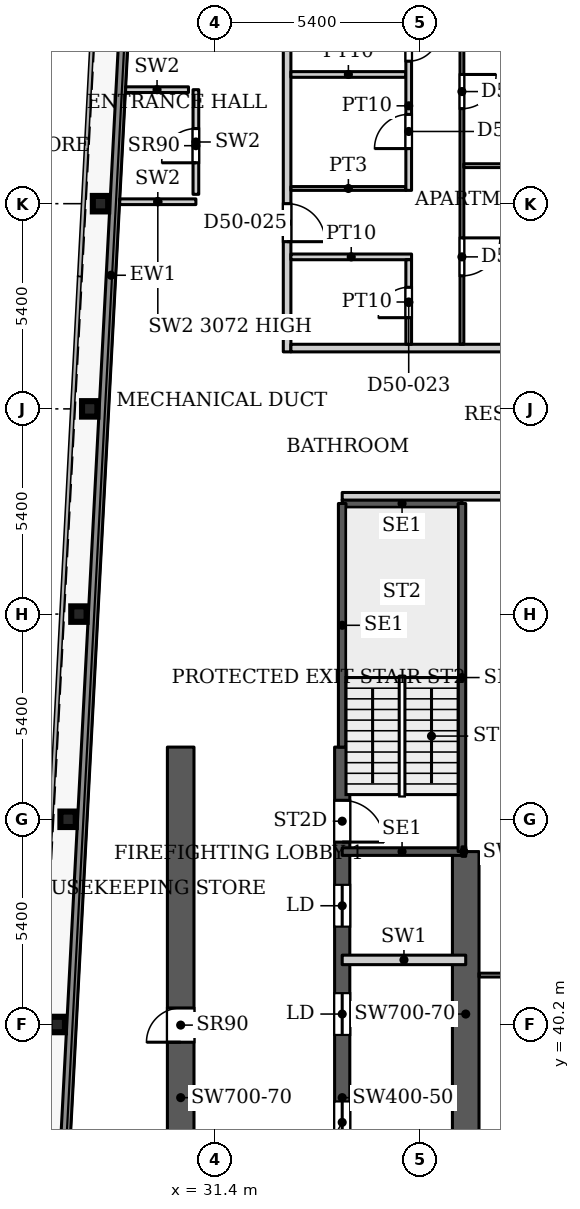
"""IFC4 building model, lengths in metres.
Left out: names, types, materials, properties, quantities, classifications, styles, units other than length and angle.
Written with IfcOpenShell. Run it as: python <this file> out.ifc"""

import sys

from ifc_helpers import new_model, si_unit, direction, frame, frame_2d, origin, origin_2d, place, context, subcontext, project, spatial, rectangle, i_section, extrude, source, transform, mapped, element, fill, save


model = new_model("IFC4")
c1 = context("Model", 3, precision=1e-05, world=origin(), true_north=direction((0.0, 1.0)))
c2 = subcontext(c1, "Body", "Model", "MODEL_VIEW")
j1 = project(units=[si_unit("LENGTHUNIT", "METRE"), si_unit("PLANEANGLEUNIT", "RADIAN")], contexts=[c1])
p1 = place(None, origin())
s1 = spatial("IfcSite", under=j1, at=p1, CompositionType="ELEMENT")
p2 = place(p1, origin())
s2 = spatial("IfcBuilding", under=s1, at=p2, CompositionType="ELEMENT")
p3 = place(p2, frame((0.0, 0.0, 220.1)))
s3 = spatial("IfcBuildingStorey", under=s2, at=p3, CompositionType="ELEMENT", Elevation=220.1)
for number, where, z_axis, x_axis in (
    (1, (27.253, 40.2, 0.0), (0.0, 0.0, 1.0), (1.0, 0.0, 0.0)),
    (2, (27.537, 45.6, 0.0), (0.0, 0.0, 1.0), (1.0, 0.0, 0.0)),
    (3, (27.822, 51.0, 0.0), (0.0, 0.0, 1.0), (1.0, 0.0, 0.0)),
    (4, (28.106, 56.4, 0.0), (0.0, 0.0, 1.0), (1.0, 0.0, 0.0)),
    (5, (28.39, 61.8, 0.0), (0.0, 0.0, 1.0), (1.0, 0.0, 0.0)),
):
    element("IfcColumn", number, at=place(p3, frame(where, z_axis=z_axis, x_axis=x_axis)), inside=s3, PredefinedType="COLUMN", context=c2, shape_type="SweptSolid", body=[
        extrude(i_section(OverallWidth=0.404, OverallDepth=0.407, WebThickness=0.027, FlangeThickness=0.044, FilletRadius=0.012, at=origin_2d()), origin(), (0.0, 0.0, 1.0), 3.9),
    ])
p4 = place(p3, frame((34.75, 29.05, 0.0), z_axis=(0.0, 0.0, 1.0), x_axis=(0.0, 1.0, 0.0)))
e6 = element("IfcWall", 6, at=p4, inside=s3, PredefinedType="SHEAR", context=c2, shape_type="SweptSolid", body=[
    extrude(rectangle(XDim=18.45, YDim=0.4, at=frame_2d((9.225, 0.0))), origin(), (0.0, 0.0, 1.0), 3.9),
])
p5 = place(p4, frame((8.025, 0.0, 0.0)))
e7 = element("IfcOpeningElement", 7, at=p5, cuts=e6, PredefinedType="OPENING", context=c2, shape_type="SweptSolid", body=[
    extrude(rectangle(XDim=1.1, YDim=2.2, at=frame_2d((0.55, 1.1))), frame((0.0, 0.21, 0.0), z_axis=(0.0, -1.0, 0.0), x_axis=(1.0, 0.0, 0.0)), (0.0, 0.0, 1.0), 0.42),
])
p6 = place(p4, frame((10.875, 0.0, 0.0)))
e8 = element("IfcOpeningElement", 8, at=p6, cuts=e6, PredefinedType="OPENING", context=c2, shape_type="SweptSolid", body=[
    extrude(rectangle(XDim=1.1, YDim=2.2, at=frame_2d((0.55, 1.1))), frame((0.0, 0.21, 0.0), z_axis=(0.0, -1.0, 0.0), x_axis=(1.0, 0.0, 0.0)), (0.0, 0.0, 1.0), 0.42),
])
p7 = place(p4, frame((13.725, 0.0, 0.0)))
e9 = element("IfcOpeningElement", 9, at=p7, cuts=e6, PredefinedType="OPENING", context=c2, shape_type="SweptSolid", body=[
    extrude(rectangle(XDim=1.1, YDim=2.2, at=frame_2d((0.55, 1.1))), frame((0.0, 0.21, 0.0), z_axis=(0.0, -1.0, 0.0), x_axis=(1.0, 0.0, 0.0)), (0.0, 0.0, 1.0), 0.42),
])
p8 = place(p4, frame((15.95, 0.0, 0.0)))
e10 = element("IfcOpeningElement", 10, at=p8, cuts=e6, PredefinedType="OPENING", context=c2, shape_type="SweptSolid", body=[
    extrude(rectangle(XDim=1.1, YDim=2.2, at=frame_2d((0.55, 1.1))), frame((0.0, 0.21, 0.0), z_axis=(0.0, -1.0, 0.0), x_axis=(1.0, 0.0, 0.0)), (0.0, 0.0, 1.0), 0.42),
])
p9 = place(p3, frame((38.0, 36.2, 0.0), z_axis=(0.0, 0.0, 1.0), x_axis=(0.0, 1.0, 0.0)))
e11 = element("IfcWall", 11, at=p9, inside=s3, PredefinedType="SHEAR", context=c2, shape_type="SweptSolid", body=[
    extrude(rectangle(XDim=8.55, YDim=0.7, at=frame_2d((4.275, 0.0))), origin(), (0.0, 0.0, 1.0), 3.9),
])
p10 = place(p3, frame((30.5, 29.05, 0.0), z_axis=(0.0, 0.0, 1.0), x_axis=(0.0, 1.0, 0.0)))
e12 = element("IfcWall", 12, at=p10, inside=s3, PredefinedType="SHEAR", context=c2, shape_type="SweptSolid", body=[
    extrude(rectangle(XDim=18.45, YDim=0.7, at=frame_2d((9.225, 0.0))), origin(), (0.0, 0.0, 1.0), 3.9),
])
p11 = place(p10, frame((6.21, 0.0, 0.0)))
e13 = element("IfcOpeningElement", 13, at=p11, cuts=e12, PredefinedType="OPENING", context=c2, shape_type="SweptSolid", body=[
    extrude(rectangle(XDim=0.9, YDim=2.2, at=frame_2d((0.45, 1.1))), frame((0.0, 0.36, 0.0), z_axis=(0.0, -1.0, 0.0), x_axis=(1.0, 0.0, 0.0)), (0.0, 0.0, 1.0), 0.72),
])
p12 = place(p10, frame((10.684, 0.0, 0.0)))
e14 = element("IfcOpeningElement", 14, at=p12, cuts=e12, PredefinedType="OPENING", context=c2, shape_type="SweptSolid", body=[
    extrude(rectangle(XDim=0.9, YDim=2.2, at=frame_2d((0.45, 1.1))), frame((0.0, 0.36, 0.0), z_axis=(0.0, -1.0, 0.0), x_axis=(1.0, 0.0, 0.0)), (0.0, 0.0, 1.0), 0.72),
])
p13 = place(p3, frame((27.195, 31.969, 0.0), z_axis=(0.0, 0.0, 1.0), x_axis=(0.052559748861, 0.998617781135, 0.0)))
e15 = element("IfcWall", 15, at=p13, inside=s3, PredefinedType="SOLIDWALL", context=c2, shape_type="SweptSolid", body=[
    extrude(rectangle(XDim=55.972, YDim=0.25, at=frame_2d((27.986, 0.0))), origin(), (0.0, 0.0, 1.0), 3.75),
])
for number, where, z_axis, x_axis in (
    (16, (34.75, 44.75, 0.0), (0.0, 0.0, 1.0), (1.0, 0.0, 0.0)),
    (17, (34.75, 53.91, 0.0), (0.0, 0.0, 1.0), (1.0, 0.0, 0.0)),
):
    element("IfcWall", number, at=place(p3, frame(where, z_axis=z_axis, x_axis=x_axis)), inside=s3, PredefinedType="SHEAR", context=c2, shape_type="SweptSolid", body=[
        extrude(rectangle(XDim=3.15, YDim=0.2, at=frame_2d((1.575, 0.0))), origin(), (0.0, 0.0, 1.0), 3.9),
    ])
p14 = place(p3, frame((34.75, 47.5, 0.0), z_axis=(0.0, 0.0, 1.0), x_axis=(0.0, 1.0, 0.0)))
e18 = element("IfcWall", 18, at=p14, inside=s3, PredefinedType="SHEAR", context=c2, shape_type="SweptSolid", body=[
    extrude(rectangle(XDim=6.41, YDim=0.2, at=frame_2d((3.205, 0.0))), origin(), (0.0, 0.0, 1.0), 3.9),
])
p15 = place(p3, frame((37.9, 44.75, 0.0), z_axis=(0.0, 0.0, 1.0), x_axis=(0.0, 1.0, 0.0)))
e19 = element("IfcWall", 19, at=p15, inside=s3, PredefinedType="SHEAR", context=c2, shape_type="SweptSolid", body=[
    extrude(rectangle(XDim=9.16, YDim=0.2, at=frame_2d((4.58, 0.0))), origin(), (0.0, 0.0, 1.0), 3.9),
])
p16 = place(p3, frame((34.75, 41.9, 0.0), z_axis=(0.0, 0.0, 1.0), x_axis=(1.0, 0.0, 0.0)))
e20 = element("IfcWall", 20, at=p16, inside=s3, PredefinedType="PARTITIONING", context=c2, shape_type="SweptSolid", body=[
    extrude(rectangle(XDim=3.25, YDim=0.25, at=frame_2d((1.625, 0.0))), origin(), (0.0, 0.0, 1.0), 3.9),
])
p17 = place(p3, frame((37.9, 44.75, 0.0), z_axis=(0.0, 0.0, 1.0), x_axis=(1.0, 0.0, 0.0)))
e21 = element("IfcWall", 21, at=p17, inside=s3, PredefinedType="PARTITIONING", context=c2, shape_type="SweptSolid", body=[
    extrude(rectangle(XDim=0.1, YDim=0.25, at=frame_2d((0.05, 0.0))), origin(), (0.0, 0.0, 1.0), 3.9),
])
p18 = place(p3, frame((28.896, 61.851, 0.0), z_axis=(0.0, 0.0, 1.0), x_axis=(1.0, 0.0, 0.0)))
e22 = element("IfcWall", 22, at=p18, inside=s3, PredefinedType="PARTITIONING", context=c2, shape_type="SweptSolid", body=[
    extrude(rectangle(XDim=2.004, YDim=0.15, at=frame_2d((1.002, 0.0))), origin(), (0.0, 0.0, 1.0), 3.072),
])
p19 = place(p3, frame((30.9, 62.046, 0.0), z_axis=(0.0, 0.0, 1.0), x_axis=(0.0, 1.0, 0.0)))
e23 = element("IfcWall", 23, at=p19, inside=s3, PredefinedType="PARTITIONING", context=c2, shape_type="SweptSolid", body=[
    extrude(rectangle(XDim=2.754, YDim=0.15, at=frame_2d((1.377, 0.0))), origin(), (0.0, 0.0, 1.0), 3.9),
])
p20 = place(p19, frame((0.83, 0.0, 0.0)))
e24 = element("IfcOpeningElement", 24, at=p20, cuts=e23, PredefinedType="OPENING", context=c2, shape_type="SweptSolid", body=[
    extrude(rectangle(XDim=0.9, YDim=2.2, at=frame_2d((0.45, 1.1))), frame((0.0, 0.085, 0.0), z_axis=(0.0, -1.0, 0.0), x_axis=(1.0, 0.0, 0.0)), (0.0, 0.0, 1.0), 0.17),
])
p21 = place(p3, frame((29.051, 64.8, 0.0), z_axis=(0.0, 0.0, 1.0), x_axis=(1.0, 0.0, 0.0)))
e25 = element("IfcWall", 25, at=p21, inside=s3, PredefinedType="PARTITIONING", context=c2, shape_type="SweptSolid", body=[
    extrude(rectangle(XDim=1.654, YDim=0.15, at=frame_2d((0.827, 0.0))), origin(), (0.0, 0.0, 1.0), 3.9),
])
p22 = place(p3, frame((33.3, 57.9, 0.0), z_axis=(0.0, 0.0, 1.0), x_axis=(0.0, 1.0, 0.0)))
e26 = element("IfcWall", 26, at=p22, inside=s3, PredefinedType="PARTITIONING", context=c2, shape_type="SweptSolid", body=[
    extrude(rectangle(XDim=17.6, YDim=0.2, at=frame_2d((8.8, 0.0))), origin(), (0.0, 0.0, 1.0), 3.6),
])
p23 = place(p22, frame((2.9, 0.0, 0.0)))
e27 = element("IfcOpeningElement", 27, at=p23, cuts=e26, PredefinedType="OPENING", context=c2, shape_type="SweptSolid", body=[
    extrude(rectangle(XDim=1.0, YDim=2.1, at=frame_2d((0.5, 1.05))), frame((0.0, 0.11, 0.0), z_axis=(0.0, -1.0, 0.0), x_axis=(1.0, 0.0, 0.0)), (0.0, 0.0, 1.0), 0.22),
])
p24 = place(p22, frame((10.7, 0.0, 0.0)))
e28 = element("IfcOpeningElement", 28, at=p24, cuts=e26, PredefinedType="OPENING", context=c2, shape_type="SweptSolid", body=[
    extrude(rectangle(XDim=1.0, YDim=2.1, at=frame_2d((0.5, 1.05))), frame((0.0, 0.11, 0.0), z_axis=(0.0, -1.0, 0.0), x_axis=(1.0, 0.0, 0.0)), (0.0, 0.0, 1.0), 0.22),
])
p25 = place(p3, frame((33.4, 58.0, 0.0), z_axis=(0.0, 0.0, 1.0), x_axis=(1.0, 0.0, 0.0)))
e29 = element("IfcWall", 29, at=p25, inside=s3, PredefinedType="PARTITIONING", context=c2, shape_type="SweptSolid", body=[
    extrude(rectangle(XDim=12.5, YDim=0.2, at=frame_2d((6.25, 0.0))), origin(), (0.0, 0.0, 1.0), 3.6),
])
p26 = place(p3, frame((33.4, 60.4, 0.0), z_axis=(0.0, 0.0, 1.0), x_axis=(1.0, 0.0, 0.0)))
e30 = element("IfcWall", 30, at=p26, inside=s3, PredefinedType="PARTITIONING", context=c2, shape_type="SweptSolid", body=[
    extrude(rectangle(XDim=3.175, YDim=0.15, at=frame_2d((1.587, 0.0))), origin(), (0.0, 0.0, 1.0), 3.6),
])
p27 = place(p3, frame((33.4, 62.2, 0.0), z_axis=(0.0, 0.0, 1.0), x_axis=(1.0, 0.0, 0.0)))
e31 = element("IfcWall", 31, at=p27, inside=s3, PredefinedType="PARTITIONING", context=c2, shape_type="SweptSolid", body=[
    extrude(rectangle(XDim=3.025, YDim=0.1, at=frame_2d((1.513, 0.0))), origin(), (0.0, 0.0, 1.0), 3.6),
])
p28 = place(p3, frame((33.4, 65.2, 0.0), z_axis=(0.0, 0.0, 1.0), x_axis=(1.0, 0.0, 0.0)))
e32 = element("IfcWall", 32, at=p28, inside=s3, PredefinedType="PARTITIONING", context=c2, shape_type="SweptSolid", body=[
    extrude(rectangle(XDim=3.025, YDim=0.15, at=frame_2d((1.513, 0.0))), origin(), (0.0, 0.0, 1.0), 3.6),
])
p29 = place(p3, frame((34.75, 54.1, 0.0), z_axis=(0.0, 0.0, 1.0), x_axis=(1.0, 0.0, 0.0)))
e33 = element("IfcWall", 33, at=p29, inside=s3, PredefinedType="PARTITIONING", context=c2, shape_type="SweptSolid", body=[
    extrude(rectangle(XDim=11.15, YDim=0.2, at=frame_2d((5.575, 0.0))), origin(), (0.0, 0.0, 1.0), 3.6),
])
p30 = place(p29, frame((5.075, 0.0, 0.0)))
e34 = element("IfcOpeningElement", 34, at=p30, cuts=e33, PredefinedType="OPENING", context=c2, shape_type="SweptSolid", body=[
    extrude(rectangle(XDim=1.0, YDim=2.1, at=frame_2d((0.5, 1.05))), frame((0.0, 0.11, 0.0), z_axis=(0.0, -1.0, 0.0), x_axis=(1.0, 0.0, 0.0)), (0.0, 0.0, 1.0), 0.22),
])
p31 = place(p3, frame((36.5, 58.1, 0.0), z_axis=(0.0, 0.0, 1.0), x_axis=(0.0, 1.0, 0.0)))
e35 = element("IfcWall", 35, at=p31, inside=s3, PredefinedType="PARTITIONING", context=c2, shape_type="SweptSolid", body=[
    extrude(rectangle(XDim=2.225, YDim=0.15, at=frame_2d((1.112, 0.0))), origin(), (0.0, 0.0, 1.0), 3.6),
])
p32 = place(p31, frame((0.7, 0.0, 0.0)))
e36 = element("IfcOpeningElement", 36, at=p32, cuts=e35, PredefinedType="OPENING", context=c2, shape_type="SweptSolid", body=[
    extrude(rectangle(XDim=0.8, YDim=2.1, at=frame_2d((0.4, 1.05))), frame((0.0, 0.085, 0.0), z_axis=(0.0, -1.0, 0.0), x_axis=(1.0, 0.0, 0.0)), (0.0, 0.0, 1.0), 0.17),
])
p33 = place(p3, frame((36.5, 62.15, 0.0), z_axis=(0.0, 0.0, 1.0), x_axis=(0.0, 1.0, 0.0)))
e37 = element("IfcWall", 37, at=p33, inside=s3, PredefinedType="PARTITIONING", context=c2, shape_type="SweptSolid", body=[
    extrude(rectangle(XDim=4.45, YDim=0.15, at=frame_2d((2.225, 0.0))), origin(), (0.0, 0.0, 1.0), 3.6),
])
p34 = place(p33, frame((1.1, 0.0, 0.0)))
e38 = element("IfcOpeningElement", 38, at=p34, cuts=e37, PredefinedType="OPENING", context=c2, shape_type="SweptSolid", body=[
    extrude(rectangle(XDim=0.9, YDim=2.1, at=frame_2d((0.45, 1.05))), frame((0.0, 0.085, 0.0), z_axis=(0.0, -1.0, 0.0), x_axis=(1.0, 0.0, 0.0)), (0.0, 0.0, 1.0), 0.17),
])
p35 = place(p33, frame((3.4, 0.0, 0.0)))
e39 = element("IfcOpeningElement", 39, at=p35, cuts=e37, PredefinedType="OPENING", context=c2, shape_type="SweptSolid", body=[
    extrude(rectangle(XDim=0.8, YDim=2.1, at=frame_2d((0.4, 1.05))), frame((0.0, 0.085, 0.0), z_axis=(0.0, -1.0, 0.0), x_axis=(1.0, 0.0, 0.0)), (0.0, 0.0, 1.0), 0.17),
])
p36 = place(p3, frame((37.9, 58.1, 0.0), z_axis=(0.0, 0.0, 1.0), x_axis=(0.0, 1.0, 0.0)))
e40 = element("IfcWall", 40, at=p36, inside=s3, PredefinedType="PARTITIONING", context=c2, shape_type="SweptSolid", body=[
    extrude(rectangle(XDim=8.5, YDim=0.1, at=frame_2d((4.25, 0.0))), origin(), (0.0, 0.0, 1.0), 3.6),
])
p37 = place(p36, frame((6.2, 0.0, 0.0)))
e41 = element("IfcOpeningElement", 41, at=p37, cuts=e40, PredefinedType="OPENING", context=c2, shape_type="SweptSolid", body=[
    extrude(rectangle(XDim=0.9, YDim=2.1, at=frame_2d((0.45, 1.05))), frame((0.0, 0.06, 0.0), z_axis=(0.0, -1.0, 0.0), x_axis=(1.0, 0.0, 0.0)), (0.0, 0.0, 1.0), 0.12),
])
p38 = place(p36, frame((1.8, 0.0, 0.0)))
e42 = element("IfcOpeningElement", 42, at=p38, cuts=e40, PredefinedType="OPENING", context=c2, shape_type="SweptSolid", body=[
    extrude(rectangle(XDim=1.0, YDim=2.1, at=frame_2d((0.5, 1.05))), frame((0.0, 0.06, 0.0), z_axis=(0.0, -1.0, 0.0), x_axis=(1.0, 0.0, 0.0)), (0.0, 0.0, 1.0), 0.12),
])
p39 = place(p3, frame((37.95, 62.8, 0.0), z_axis=(0.0, 0.0, 1.0), x_axis=(1.0, 0.0, 0.0)))
e43 = element("IfcWall", 43, at=p39, inside=s3, PredefinedType="PARTITIONING", context=c2, shape_type="SweptSolid", body=[
    extrude(rectangle(XDim=7.95, YDim=0.1, at=frame_2d((3.975, 0.0))), origin(), (0.0, 0.0, 1.0), 3.6),
])
p40 = place(p3, frame((38.349, 41.5, 0.0), z_axis=(0.0, 0.0, 1.0), x_axis=(1.0, 0.0, 0.0)))
e44 = element("IfcWall", 44, at=p40, inside=s3, PredefinedType="PARTITIONING", context=c2, shape_type="SweptSolid", body=[
    extrude(rectangle(XDim=14.951, YDim=0.1, at=frame_2d((7.476, 0.0))), origin(), (0.0, 0.0, 1.0), 3.6),
])
p41 = place(p40, frame((6.851, 0.0, 0.0)))
e45 = element("IfcOpeningElement", 45, at=p41, cuts=e44, PredefinedType="OPENING", context=c2, shape_type="SweptSolid", body=[
    extrude(rectangle(XDim=1.0, YDim=2.1, at=frame_2d((0.5, 1.05))), frame((0.0, 0.06, 0.0), z_axis=(0.0, -1.0, 0.0), x_axis=(1.0, 0.0, 0.0)), (0.0, 0.0, 1.0), 0.12),
])
m1 = source(origin(), c2, "Body", "SweptSolid", [
    extrude(rectangle(XDim=1.1, YDim=2.2, at=frame_2d((0.55, 1.1))), frame((0.0, 0.025, 0.0), z_axis=(0.0, -1.0, 0.0), x_axis=(1.0, 0.0, 0.0)), (0.0, 0.0, 1.0), 0.05),
])
p42 = place(p5, origin())
e46 = element("IfcDoor", 46, at=p42, inside=s3, OperationType="SLIDING_TO_LEFT", PredefinedType="DOOR", context=c2, shape_type="MappedRepresentation", body=[
    mapped(m1, transform((0.0, 0.0, 0.0), x_axis=(1.0, 0.0, 0.0), y_axis=(0.0, 1.0, 0.0), z_axis=(0.0, 0.0, 1.0), scale=1.0)),
])
fill(e7, e46)
p43 = place(p6, origin())
e47 = element("IfcDoor", 47, at=p43, inside=s3, OperationType="SLIDING_TO_LEFT", PredefinedType="DOOR", context=c2, shape_type="MappedRepresentation", body=[
    mapped(m1, transform((0.0, 0.0, 0.0), x_axis=(1.0, 0.0, 0.0), y_axis=(0.0, 1.0, 0.0), z_axis=(0.0, 0.0, 1.0), scale=1.0)),
])
fill(e8, e47)
p44 = place(p7, origin())
e48 = element("IfcDoor", 48, at=p44, inside=s3, OperationType="SLIDING_TO_LEFT", PredefinedType="DOOR", context=c2, shape_type="MappedRepresentation", body=[
    mapped(m1, transform((0.0, 0.0, 0.0), x_axis=(1.0, 0.0, 0.0), y_axis=(0.0, 1.0, 0.0), z_axis=(0.0, 0.0, 1.0), scale=1.0)),
])
fill(e9, e48)
m2 = source(origin(), c2, "Body", "SweptSolid", [
    extrude(rectangle(XDim=0.9, YDim=2.2, at=frame_2d((0.45, 1.1))), frame((0.0, 0.025, 0.0), z_axis=(0.0, -1.0, 0.0), x_axis=(1.0, 0.0, 0.0)), (0.0, 0.0, 1.0), 0.05),
])
p45 = place(p12, origin())
e49 = element("IfcDoor", 49, at=p45, inside=s3, OperationType="SINGLE_SWING_LEFT", PredefinedType="DOOR", context=c2, shape_type="MappedRepresentation", body=[
    mapped(m2, transform((0.0, 0.0, 0.0), x_axis=(1.0, 0.0, 0.0), y_axis=(0.0, 1.0, 0.0), z_axis=(0.0, 0.0, 1.0), scale=1.0)),
])
fill(e14, e49)
p46 = place(p20, origin())
e50 = element("IfcDoor", 50, at=p46, inside=s3, OperationType="SINGLE_SWING_LEFT", PredefinedType="DOOR", context=c2, shape_type="MappedRepresentation", body=[
    mapped(m2, transform((0.0, 0.0, 0.0), x_axis=(1.0, 0.0, 0.0), y_axis=(0.0, 1.0, 0.0), z_axis=(0.0, 0.0, 1.0), scale=1.0)),
])
fill(e24, e50)
m3 = source(origin(), c2, "Body", "SweptSolid", [
    extrude(rectangle(XDim=1.1, YDim=2.2, at=frame_2d((0.55, 1.1))), frame((0.0, 0.025, 0.0), z_axis=(0.0, -1.0, 0.0), x_axis=(1.0, 0.0, 0.0)), (0.0, 0.0, 1.0), 0.05),
])
p47 = place(p8, origin())
e51 = element("IfcDoor", 51, at=p47, inside=s3, OperationType="SINGLE_SWING_RIGHT", PredefinedType="DOOR", context=c2, shape_type="MappedRepresentation", body=[
    mapped(m3, transform((0.0, 0.0, 0.0), x_axis=(1.0, 0.0, 0.0), y_axis=(0.0, 1.0, 0.0), z_axis=(0.0, 0.0, 1.0), scale=1.0)),
])
fill(e10, e51)
m4 = source(origin(), c2, "Body", "SweptSolid", [
    extrude(rectangle(XDim=0.8, YDim=2.1, at=frame_2d((0.4, 1.05))), frame((0.0, 0.025, 0.0), z_axis=(0.0, -1.0, 0.0), x_axis=(1.0, 0.0, 0.0)), (0.0, 0.0, 1.0), 0.05),
])
p48 = place(p32, origin())
e52 = element("IfcDoor", 52, at=p48, inside=s3, OperationType="SINGLE_SWING_LEFT", PredefinedType="DOOR", context=c2, shape_type="MappedRepresentation", body=[
    mapped(m4, transform((0.0, 0.0, 0.0), x_axis=(1.0, 0.0, 0.0), y_axis=(0.0, 1.0, 0.0), z_axis=(0.0, 0.0, 1.0), scale=1.0)),
])
fill(e36, e52)
m5 = source(origin(), c2, "Body", "SweptSolid", [
    extrude(rectangle(XDim=0.9, YDim=2.1, at=frame_2d((0.45, 1.05))), frame((0.0, 0.025, 0.0), z_axis=(0.0, -1.0, 0.0), x_axis=(1.0, 0.0, 0.0)), (0.0, 0.0, 1.0), 0.05),
])
p49 = place(p37, origin())
e53 = element("IfcDoor", 53, at=p49, inside=s3, OperationType="SINGLE_SWING_RIGHT", PredefinedType="DOOR", context=c2, shape_type="MappedRepresentation", body=[
    mapped(m5, transform((0.0, 0.0, 0.0), x_axis=(1.0, 0.0, 0.0), y_axis=(0.0, 1.0, 0.0), z_axis=(0.0, 0.0, 1.0), scale=1.0)),
])
fill(e41, e53)
m6 = source(origin(), c2, "Body", "SweptSolid", [
    extrude(rectangle(XDim=1.0, YDim=2.1, at=frame_2d((0.5, 1.05))), frame((0.0, 0.025, 0.0), z_axis=(0.0, -1.0, 0.0), x_axis=(1.0, 0.0, 0.0)), (0.0, 0.0, 1.0), 0.05),
])
p50 = place(p23, origin())
e54 = element("IfcDoor", 54, at=p50, inside=s3, OperationType="SINGLE_SWING_RIGHT", PredefinedType="DOOR", context=c2, shape_type="MappedRepresentation", body=[
    mapped(m6, transform((0.0, 0.0, 0.0), x_axis=(1.0, 0.0, 0.0), y_axis=(0.0, 1.0, 0.0), z_axis=(0.0, 0.0, 1.0), scale=1.0)),
])
fill(e27, e54)
p51 = place(p34, origin())
e55 = element("IfcDoor", 55, at=p51, inside=s3, OperationType="SINGLE_SWING_LEFT", PredefinedType="DOOR", context=c2, shape_type="MappedRepresentation", body=[
    mapped(m5, transform((0.0, 0.0, 0.0), x_axis=(1.0, 0.0, 0.0), y_axis=(0.0, 1.0, 0.0), z_axis=(0.0, 0.0, 1.0), scale=1.0)),
])
fill(e38, e55)
m7 = source(origin(), c2, "Body", "SweptSolid", [
    extrude(rectangle(XDim=1.0, YDim=2.1, at=frame_2d((0.5, 1.05))), frame((0.0, 0.025, 0.0), z_axis=(0.0, -1.0, 0.0), x_axis=(1.0, 0.0, 0.0)), (0.0, 0.0, 1.0), 0.05),
])
p52 = place(p38, origin())
e56 = element("IfcDoor", 56, at=p52, inside=s3, OperationType="SINGLE_SWING_RIGHT", PredefinedType="DOOR", context=c2, shape_type="MappedRepresentation", body=[
    mapped(m7, transform((0.0, 0.0, 0.0), x_axis=(1.0, 0.0, 0.0), y_axis=(0.0, 1.0, 0.0), z_axis=(0.0, 0.0, 1.0), scale=1.0)),
])
fill(e42, e56)
p53 = place(p35, origin())
e57 = element("IfcDoor", 57, at=p53, inside=s3, OperationType="SINGLE_SWING_RIGHT", PredefinedType="DOOR", context=c2, shape_type="MappedRepresentation", body=[
    mapped(m4, transform((0.0, 0.0, 0.0), x_axis=(1.0, 0.0, 0.0), y_axis=(0.0, 1.0, 0.0), z_axis=(0.0, 0.0, 1.0), scale=1.0)),
])
fill(e39, e57)
save(model, sys.argv[1])
